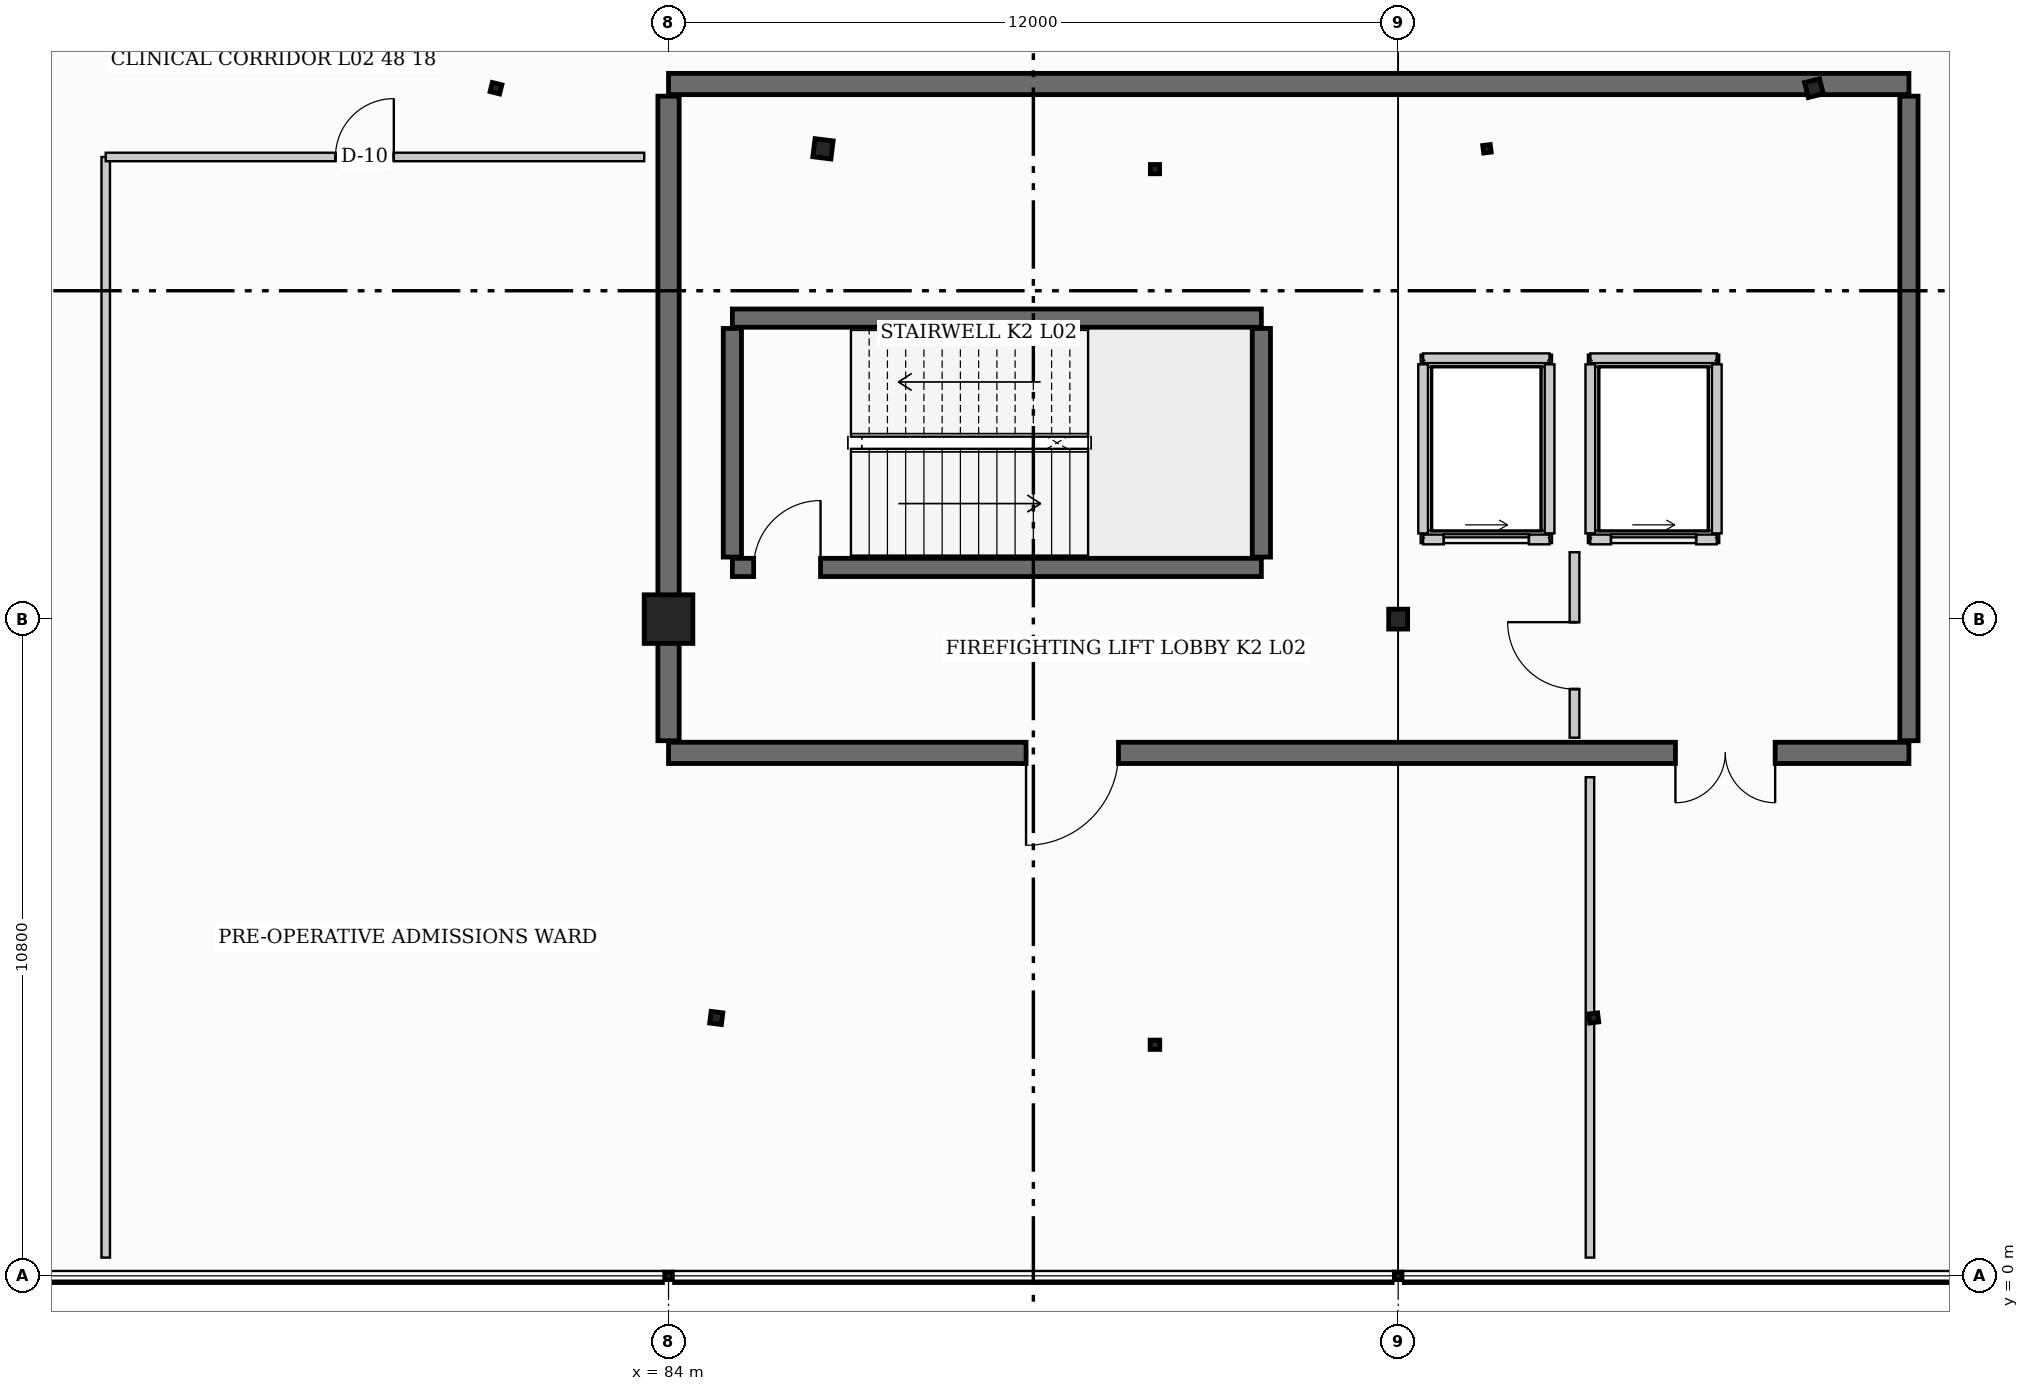
"""IFC4 building model, lengths in metres.
Left out: names, types, materials, properties, quantities, classifications, styles, units other than length and angle.
Written with IfcOpenShell. Run it as: python <this file> out.ifc"""

import sys

from ifc_helpers import new_model, si_unit, direction, frame, frame_2d, origin, origin_2d, place, context, subcontext, project, spatial, rectangle, hollow_rectangle, hollow_circle, i_section, extrude, element, fill, save


model = new_model("IFC4")
c1 = context("Model", 3, precision=1e-05, world=origin(), true_north=direction((0.0, 1.0)))
c2 = subcontext(c1, "Body", "Model", "MODEL_VIEW")
j1 = project(units=[si_unit("LENGTHUNIT", "METRE"), si_unit("PLANEANGLEUNIT", "RADIAN")], contexts=[c1])
p1 = place(None, origin())
s1 = spatial("IfcSite", under=j1, at=p1, CompositionType="ELEMENT")
p2 = place(p1, origin())
s2 = spatial("IfcBuilding", under=s1, at=p2, CompositionType="ELEMENT")
p3 = place(p2, frame((0.0, 0.0, 9.6)))
s3 = spatial("IfcBuildingStorey", under=s2, at=p3, CompositionType="ELEMENT", Elevation=9.6)
p4 = place(p3, frame((84.0, 0.0, 0.0), z_axis=(0.0, 0.0, 1.0), x_axis=(0.0, 1.0, 0.0)))
e1 = element("IfcColumn", 1, at=p4, inside=s3, PredefinedType="COLUMN", context=c2, shape_type="SweptSolid", body=[
    extrude(hollow_rectangle(XDim=0.125, YDim=0.125, WallThickness=0.006, at=origin_2d()), origin(), (0.0, 0.0, 1.0), 4.8),
])
p5 = place(p3, frame((84.0, 10.8, 0.0), z_axis=(0.0, 0.0, 1.0), x_axis=(0.0, 1.0, 0.0)))
e2 = element("IfcColumn", 2, at=p5, inside=s3, PredefinedType="COLUMN", context=c2, shape_type="SweptSolid", body=[
    extrude(rectangle(XDim=0.8, YDim=0.8, at=origin_2d()), origin(), (0.0, 0.0, 1.0), 4.8),
])
p6 = place(p3, frame((96.0, 0.0, 0.0), z_axis=(0.0, 0.0, 1.0), x_axis=(1.0, 0.0, 0.0)))
e3 = element("IfcColumn", 3, at=p6, inside=s3, PredefinedType="COLUMN", context=c2, shape_type="SweptSolid", body=[
    extrude(hollow_rectangle(XDim=0.125, YDim=0.125, WallThickness=0.006, at=origin_2d()), origin(), (0.0, 0.0, 1.0), 4.8),
])
p7 = place(p3, frame((96.0, 10.8, 0.0), z_axis=(0.0, 0.0, 1.0), x_axis=(1.0, 0.0, 0.0)))
e4 = element("IfcColumn", 4, at=p7, inside=s3, PredefinedType="COLUMN", context=c2, shape_type="SweptSolid", body=[
    extrude(i_section(OverallWidth=0.311, OverallDepth=0.327, WebThickness=0.016, FlangeThickness=0.025, at=origin_2d()), origin(), (0.0, 0.0, 1.0), 4.8),
])
p8 = place(p3, frame((77.678, 5.558, 0.0), z_axis=(0.0, 0.0, 1.0), x_axis=(0.2419218956, 0.970295726276, 0.0)))
e5 = element("IfcColumn", 5, at=p8, inside=s3, PredefinedType="COLUMN", context=c2, shape_type="SweptSolid", body=[
    extrude(i_section(OverallWidth=0.203, OverallDepth=0.203, WebThickness=0.007, FlangeThickness=0.011, at=origin_2d()), origin(), (0.0, 0.0, 1.0), 4.8),
])
p9 = place(p3, frame((81.162, 19.531, 0.0), z_axis=(0.0, 0.0, 1.0), x_axis=(0.2419218956, 0.970295726276, 0.0)))
e6 = element("IfcColumn", 6, at=p9, inside=s3, PredefinedType="COLUMN", context=c2, shape_type="SweptSolid", body=[
    extrude(i_section(OverallWidth=0.154, OverallDepth=0.162, WebThickness=0.008, FlangeThickness=0.011, at=origin_2d()), origin(), (0.0, 0.0, 1.0), 4.8),
])
p10 = place(p3, frame((84.785, 4.241, 0.0), z_axis=(0.0, 0.0, 1.0), x_axis=(0.121869343405, 0.992546151641, 0.0)))
e7 = element("IfcColumn", 7, at=p10, inside=s3, PredefinedType="COLUMN", context=c2, shape_type="SweptSolid", body=[
    extrude(hollow_circle(Radius=0.097, WallThickness=0.008, at=origin_2d()), origin(), (0.0, 0.0, 1.0), 4.8),
])
p11 = place(p3, frame((86.54, 18.534, 0.0), z_axis=(0.0, 0.0, 1.0), x_axis=(0.121869343405, 0.992546151641, 0.0)))
e8 = element("IfcColumn", 8, at=p11, inside=s3, PredefinedType="COLUMN", context=c2, shape_type="SweptSolid", body=[
    extrude(hollow_rectangle(XDim=0.3, YDim=0.3, WallThickness=0.012, at=origin_2d()), origin(), (0.0, 0.0, 1.0), 4.8),
])
p12 = place(p3, frame((92.0, 3.8, 0.0), z_axis=(0.0, 0.0, 1.0), x_axis=(0.0, 1.0, 0.0)))
e9 = element("IfcColumn", 9, at=p12, inside=s3, PredefinedType="COLUMN", context=c2, shape_type="SweptSolid", body=[
    extrude(i_section(OverallWidth=0.153, OverallDepth=0.158, WebThickness=0.007, FlangeThickness=0.01, at=origin_2d()), origin(), (0.0, 0.0, 1.0), 4.8),
])
p13 = place(p3, frame((92.0, 18.2, 0.0), z_axis=(0.0, 0.0, 1.0), x_axis=(0.0, 1.0, 0.0)))
e10 = element("IfcColumn", 10, at=p13, inside=s3, PredefinedType="COLUMN", context=c2, shape_type="SweptSolid", body=[
    extrude(i_section(OverallWidth=0.152, OverallDepth=0.152, WebThickness=0.006, FlangeThickness=0.007, at=origin_2d()), origin(), (0.0, 0.0, 1.0), 4.8),
])
p14 = place(p3, frame((99.215, 4.241, 0.0), z_axis=(0.0, 0.0, 1.0), x_axis=(-0.121869343405, 0.992546151641, 0.0)))
e11 = element("IfcColumn", 11, at=p14, inside=s3, PredefinedType="COLUMN", context=c2, shape_type="SweptSolid", body=[
    extrude(hollow_rectangle(XDim=0.15, YDim=0.15, WallThickness=0.008, at=origin_2d()), origin(), (0.0, 0.0, 1.0), 4.8),
])
p15 = place(p3, frame((97.46, 18.534, 0.0), z_axis=(0.0, 0.0, 1.0), x_axis=(-0.121869343405, 0.992546151641, 0.0)))
e12 = element("IfcColumn", 12, at=p15, inside=s3, PredefinedType="COLUMN", context=c2, shape_type="SweptSolid", body=[
    extrude(hollow_rectangle(XDim=0.125, YDim=0.125, WallThickness=0.006, at=origin_2d()), origin(), (0.0, 0.0, 1.0), 4.8),
])
p16 = place(p3, frame((102.838, 19.531, 0.0), z_axis=(0.0, 0.0, 1.0), x_axis=(-0.2419218956, 0.970295726276, 0.0)))
e13 = element("IfcColumn", 13, at=p16, inside=s3, PredefinedType="COLUMN", context=c2, shape_type="SweptSolid", body=[
    extrude(i_section(OverallWidth=0.254, OverallDepth=0.254, WebThickness=0.009, FlangeThickness=0.014, at=origin_2d()), origin(), (0.0, 0.0, 1.0), 4.8),
])
p17 = place(p3, frame((84.0, 19.6, 0.0), z_axis=(0.0, 0.0, 1.0), x_axis=(1.0, 0.0, 0.0)))
e14 = element("IfcWall", 14, at=p17, inside=s3, PredefinedType="SHEAR", context=c2, shape_type="SweptSolid", body=[
    extrude(rectangle(XDim=20.4, YDim=0.35, at=frame_2d((10.2, 0.0))), origin(), (0.0, 0.0, 1.0), 4.8),
])
p18 = place(p3, frame((104.4, 8.6, 0.0), z_axis=(0.0, 0.0, 1.0), x_axis=(-1.0, 0.0, 0.0)))
e15 = element("IfcWall", 15, at=p18, inside=s3, PredefinedType="SHEAR", context=c2, shape_type="SweptSolid", body=[
    extrude(rectangle(XDim=20.4, YDim=0.35, at=frame_2d((10.2, 0.0))), origin(), (0.0, 0.0, 1.0), 4.8),
])
p19 = place(p18, frame((2.2, 0.0, 0.0)))
e16 = element("IfcOpeningElement", 16, at=p19, cuts=e15, PredefinedType="OPENING", context=c2, shape_type="SweptSolid", body=[
    extrude(rectangle(XDim=1.64, YDim=2.2, at=frame_2d((0.82, 1.1))), frame((0.0, 0.185, 0.0), z_axis=(0.0, -1.0, 0.0), x_axis=(1.0, 0.0, 0.0)), (0.0, 0.0, 1.0), 0.37),
])
p20 = place(p18, frame((13.0, 0.0, 0.0)))
e17 = element("IfcOpeningElement", 17, at=p20, cuts=e15, PredefinedType="OPENING", context=c2, shape_type="SweptSolid", body=[
    extrude(rectangle(XDim=1.52, YDim=2.16, at=frame_2d((0.76, 1.08))), frame((0.0, 0.185, 0.0), z_axis=(0.0, -1.0, 0.0), x_axis=(1.0, 0.0, 0.0)), (0.0, 0.0, 1.0), 0.37),
])
p21 = place(p3, frame((84.0, 8.8, 0.0), z_axis=(0.0, 0.0, 1.0), x_axis=(0.0, 1.0, 0.0)))
e18 = element("IfcWall", 18, at=p21, inside=s3, PredefinedType="SHEAR", context=c2, shape_type="SweptSolid", body=[
    extrude(rectangle(XDim=10.6, YDim=0.35, at=frame_2d((5.3, 0.0))), origin(), (0.0, 0.0, 1.0), 4.8),
])
p22 = place(p3, frame((104.4, 19.4, 0.0), z_axis=(0.0, 0.0, 1.0), x_axis=(0.0, -1.0, 0.0)))
e19 = element("IfcWall", 19, at=p22, inside=s3, PredefinedType="SHEAR", context=c2, shape_type="SweptSolid", body=[
    extrude(rectangle(XDim=10.6, YDim=0.3, at=frame_2d((5.3, 0.0))), origin(), (0.0, 0.0, 1.0), 4.8),
])
p23 = place(p3, frame((85.05, 11.65, 0.0), z_axis=(0.0, 0.0, 1.0), x_axis=(1.0, 0.0, 0.0)))
e20 = element("IfcWall", 20, at=p23, inside=s3, PredefinedType="SHEAR", context=c2, shape_type="SweptSolid", body=[
    extrude(rectangle(XDim=8.7, YDim=0.3, at=frame_2d((4.35, 0.0))), origin(), (0.0, 0.0, 1.0), 4.8),
])
p24 = place(p23, frame((0.35, 0.0, 0.0)))
e21 = element("IfcOpeningElement", 21, at=p24, cuts=e20, PredefinedType="OPENING", context=c2, shape_type="SweptSolid", body=[
    extrude(rectangle(XDim=1.1, YDim=2.15, at=frame_2d((0.55, 1.075))), frame((0.0, 0.16, 0.0), z_axis=(0.0, -1.0, 0.0), x_axis=(1.0, 0.0, 0.0)), (0.0, 0.0, 1.0), 0.32),
])
p25 = place(p3, frame((93.75, 15.75, 0.0), z_axis=(0.0, 0.0, 1.0), x_axis=(-1.0, 0.0, 0.0)))
e22 = element("IfcWall", 22, at=p25, inside=s3, PredefinedType="SHEAR", context=c2, shape_type="SweptSolid", body=[
    extrude(rectangle(XDim=8.7, YDim=0.3, at=frame_2d((4.35, 0.0))), origin(), (0.0, 0.0, 1.0), 4.8),
])
for number, where, z_axis, x_axis in (
    (23, (85.05, 11.82, 0.0), (0.0, 0.0, 1.0), (0.0, 1.0, 0.0)),
    (24, (93.75, 11.82, 0.0), (0.0, 0.0, 1.0), (0.0, 1.0, 0.0)),
):
    element("IfcWall", number, at=place(p3, frame(where, z_axis=z_axis, x_axis=x_axis)), inside=s3, PredefinedType="SHEAR", context=c2, shape_type="SweptSolid", body=[
        extrude(rectangle(XDim=3.76, YDim=0.3, at=frame_2d((1.88, 0.0))), origin(), (0.0, 0.0, 1.0), 4.8),
    ])
p26 = place(p3, frame((96.41, 12.11, 0.0), z_axis=(0.0, 0.0, 1.0), x_axis=(1.0, 0.0, 0.0)))
e25 = element("IfcWall", 25, at=p26, inside=s3, PredefinedType="PARTITIONING", context=c2, shape_type="SweptSolid", body=[
    extrude(rectangle(XDim=2.08, YDim=0.16, at=frame_2d((1.04, 0.0))), origin(), (0.0, 0.0, 1.0), 4.43),
])
p27 = place(p26, frame((0.34, 0.0, 0.0)))
e26 = element("IfcOpeningElement", 26, at=p27, cuts=e25, PredefinedType="OPENING", context=c2, shape_type="SweptSolid", body=[
    extrude(rectangle(XDim=1.4, YDim=2.2, at=frame_2d((0.7, 1.1))), frame((0.0, 0.09, 0.0), z_axis=(0.0, -1.0, 0.0), x_axis=(1.0, 0.0, 0.0)), (0.0, 0.0, 1.0), 0.18),
])
p28 = place(p3, frame((98.49, 15.09, 0.0), z_axis=(0.0, 0.0, 1.0), x_axis=(-1.0, 0.0, 0.0)))
e27 = element("IfcWall", 27, at=p28, inside=s3, PredefinedType="PARTITIONING", context=c2, shape_type="SweptSolid", body=[
    extrude(rectangle(XDim=2.08, YDim=0.16, at=frame_2d((1.04, 0.0))), origin(), (0.0, 0.0, 1.0), 4.43),
])
for number, where, z_axis, x_axis in (
    (28, (96.41, 14.99, 0.0), (0.0, 0.0, 1.0), (0.0, -1.0, 0.0)),
    (29, (98.49, 12.21, 0.0), (0.0, 0.0, 1.0), (0.0, 1.0, 0.0)),
):
    element("IfcWall", number, at=place(p3, frame(where, z_axis=z_axis, x_axis=x_axis)), inside=s3, PredefinedType="PARTITIONING", context=c2, shape_type="SweptSolid", body=[
        extrude(rectangle(XDim=2.78, YDim=0.16, at=frame_2d((1.39, 0.0))), origin(), (0.0, 0.0, 1.0), 4.43),
    ])
p29 = place(p3, frame((99.16, 12.11, 0.0), z_axis=(0.0, 0.0, 1.0), x_axis=(1.0, 0.0, 0.0)))
e30 = element("IfcWall", 30, at=p29, inside=s3, PredefinedType="PARTITIONING", context=c2, shape_type="SweptSolid", body=[
    extrude(rectangle(XDim=2.08, YDim=0.16, at=frame_2d((1.04, 0.0))), origin(), (0.0, 0.0, 1.0), 4.43),
])
p30 = place(p29, frame((0.34, 0.0, 0.0)))
e31 = element("IfcOpeningElement", 31, at=p30, cuts=e30, PredefinedType="OPENING", context=c2, shape_type="SweptSolid", body=[
    extrude(rectangle(XDim=1.4, YDim=2.2, at=frame_2d((0.7, 1.1))), frame((0.0, 0.09, 0.0), z_axis=(0.0, -1.0, 0.0), x_axis=(1.0, 0.0, 0.0)), (0.0, 0.0, 1.0), 0.18),
])
p31 = place(p3, frame((101.24, 15.09, 0.0), z_axis=(0.0, 0.0, 1.0), x_axis=(-1.0, 0.0, 0.0)))
e32 = element("IfcWall", 32, at=p31, inside=s3, PredefinedType="PARTITIONING", context=c2, shape_type="SweptSolid", body=[
    extrude(rectangle(XDim=2.08, YDim=0.16, at=frame_2d((1.04, 0.0))), origin(), (0.0, 0.0, 1.0), 4.43),
])
for number, where, z_axis, x_axis in (
    (33, (99.16, 14.99, 0.0), (0.0, 0.0, 1.0), (0.0, -1.0, 0.0)),
    (34, (101.24, 12.21, 0.0), (0.0, 0.0, 1.0), (0.0, 1.0, 0.0)),
):
    element("IfcWall", number, at=place(p3, frame(where, z_axis=z_axis, x_axis=x_axis)), inside=s3, PredefinedType="PARTITIONING", context=c2, shape_type="SweptSolid", body=[
        extrude(rectangle(XDim=2.78, YDim=0.16, at=frame_2d((1.39, 0.0))), origin(), (0.0, 0.0, 1.0), 4.43),
    ])
p32 = place(p3, frame((98.9, 8.85, 0.0), z_axis=(0.0, 0.0, 1.0), x_axis=(0.0, 1.0, 0.0)))
e35 = element("IfcWall", 35, at=p32, inside=s3, PredefinedType="PARTITIONING", context=c2, shape_type="SweptSolid", body=[
    extrude(rectangle(XDim=3.05, YDim=0.16, at=frame_2d((1.525, 0.0))), origin(), (0.0, 0.0, 1.0), 3.961),
])
p33 = place(p32, frame((0.8, 0.0, 0.0)))
e36 = element("IfcOpeningElement", 36, at=p33, cuts=e35, PredefinedType="OPENING", context=c2, shape_type="SweptSolid", body=[
    extrude(rectangle(XDim=1.1, YDim=2.15, at=frame_2d((0.55, 1.075))), frame((0.0, 0.09, 0.0), z_axis=(0.0, -1.0, 0.0), x_axis=(1.0, 0.0, 0.0)), (0.0, 0.0, 1.0), 0.18),
])
p34 = place(p3, frame((74.744, 0.3, 0.0), z_axis=(0.0, 0.0, 1.0), x_axis=(0.0, 1.0, 0.0)))
e37 = element("IfcWall", 37, at=p34, inside=s3, PredefinedType="PARTITIONING", context=c2, shape_type="SweptSolid", body=[
    extrude(rectangle(XDim=18.1, YDim=0.14, at=frame_2d((9.05, 0.0))), origin(), (0.0, 0.0, 1.0), 3.803),
])
p35 = place(p3, frame((74.744, 18.4, 0.0), z_axis=(0.0, 0.0, 1.0), x_axis=(1.0, 0.0, 0.0)))
e38 = element("IfcWall", 38, at=p35, inside=s3, PredefinedType="PARTITIONING", context=c2, shape_type="SweptSolid", body=[
    extrude(rectangle(XDim=8.856, YDim=0.14, at=frame_2d((4.428, 0.0))), origin(), (0.0, 0.0, 1.0), 3.803),
])
p36 = place(p35, frame((3.778, 0.0, 0.0)))
e39 = element("IfcOpeningElement", 39, at=p36, cuts=e38, PredefinedType="OPENING", context=c2, shape_type="SweptSolid", body=[
    extrude(rectangle(XDim=0.96, YDim=2.06, at=frame_2d((0.48, 1.03))), frame((0.0, 0.08, 0.0), z_axis=(0.0, -1.0, 0.0), x_axis=(1.0, 0.0, 0.0)), (0.0, 0.0, 1.0), 0.16),
])
p37 = place(p3, frame((99.154, 0.3, 0.0), z_axis=(0.0, 0.0, 1.0), x_axis=(0.0, 1.0, 0.0)))
e40 = element("IfcWall", 40, at=p37, inside=s3, PredefinedType="PARTITIONING", context=c2, shape_type="SweptSolid", body=[
    extrude(rectangle(XDim=7.9, YDim=0.14, at=frame_2d((3.95, 0.0))), origin(), (0.0, 0.0, 1.0), 4.065),
])
p38 = place(p27, origin())
e41 = element("IfcDoor", 41, at=p38, inside=s3, OperationType="SLIDING_TO_RIGHT", PredefinedType="DOOR", context=c2, shape_type="SweptSolid", body=[
    extrude(rectangle(XDim=1.4, YDim=2.2, at=frame_2d((0.7, 1.1))), frame((0.0, 0.025, 0.0), z_axis=(0.0, -1.0, 0.0), x_axis=(1.0, 0.0, 0.0)), (0.0, 0.0, 1.0), 0.05),
])
fill(e26, e41)
p39 = place(p30, origin())
e42 = element("IfcDoor", 42, at=p39, inside=s3, OperationType="SLIDING_TO_RIGHT", PredefinedType="DOOR", context=c2, shape_type="SweptSolid", body=[
    extrude(rectangle(XDim=1.4, YDim=2.2, at=frame_2d((0.7, 1.1))), frame((0.0, 0.025, 0.0), z_axis=(0.0, -1.0, 0.0), x_axis=(1.0, 0.0, 0.0)), (0.0, 0.0, 1.0), 0.05),
])
fill(e31, e42)
p40 = place(p24, origin())
e43 = element("IfcDoor", 43, at=p40, inside=s3, OperationType="SINGLE_SWING_RIGHT", PredefinedType="DOOR", context=c2, shape_type="SweptSolid", body=[
    extrude(rectangle(XDim=1.1, YDim=2.15, at=frame_2d((0.55, 1.075))), frame((0.0, 0.025, 0.0), z_axis=(0.0, -1.0, 0.0), x_axis=(1.0, 0.0, 0.0)), (0.0, 0.0, 1.0), 0.05),
])
fill(e21, e43)
p41 = place(p19, origin())
e44 = element("IfcDoor", 44, at=p41, inside=s3, OperationType="DOUBLE_DOOR_SINGLE_SWING", PredefinedType="DOOR", context=c2, shape_type="SweptSolid", body=[
    extrude(rectangle(XDim=1.64, YDim=2.2, at=frame_2d((0.82, 1.1))), frame((0.0, 0.025, 0.0), z_axis=(0.0, -1.0, 0.0), x_axis=(1.0, 0.0, 0.0)), (0.0, 0.0, 1.0), 0.05),
])
fill(e16, e44)
p42 = place(p20, origin())
e45 = element("IfcDoor", 45, at=p42, inside=s3, OperationType="SINGLE_SWING_RIGHT", PredefinedType="DOOR", context=c2, shape_type="SweptSolid", body=[
    extrude(rectangle(XDim=1.52, YDim=2.16, at=frame_2d((0.76, 1.08))), frame((0.0, 0.025, 0.0), z_axis=(0.0, -1.0, 0.0), x_axis=(1.0, 0.0, 0.0)), (0.0, 0.0, 1.0), 0.05),
])
fill(e17, e45)
p43 = place(p33, origin())
e46 = element("IfcDoor", 46, at=p43, inside=s3, OperationType="SINGLE_SWING_RIGHT", PredefinedType="DOOR", context=c2, shape_type="SweptSolid", body=[
    extrude(rectangle(XDim=1.1, YDim=2.15, at=frame_2d((0.55, 1.075))), frame((0.0, 0.025, 0.0), z_axis=(0.0, -1.0, 0.0), x_axis=(1.0, 0.0, 0.0)), (0.0, 0.0, 1.0), 0.05),
])
fill(e36, e46)
p44 = place(p36, origin())
e47 = element("IfcDoor", 47, at=p44, inside=s3, OperationType="SINGLE_SWING_RIGHT", PredefinedType="DOOR", context=c2, shape_type="SweptSolid", body=[
    extrude(rectangle(XDim=0.96, YDim=2.06, at=frame_2d((0.48, 1.03))), frame((0.0, 0.025, 0.0), z_axis=(0.0, -1.0, 0.0), x_axis=(1.0, 0.0, 0.0)), (0.0, 0.0, 1.0), 0.05),
])
fill(e39, e47)
save(model, sys.argv[1])
